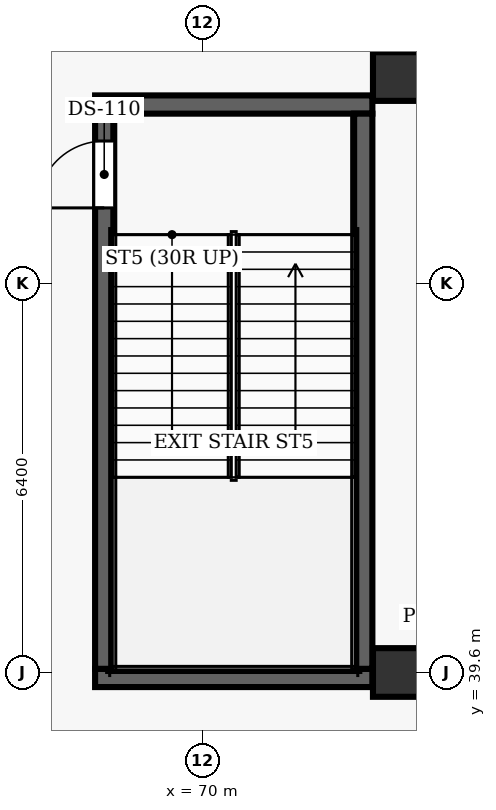
"""IFC4 building model, lengths in metres.
Left out: names, types, materials, properties, quantities, classifications, styles, units other than length and angle.
Written with IfcOpenShell. Run it as: python <this file> out.ifc"""

import sys

from ifc_helpers import new_model, si_unit, direction, frame, frame_2d, origin, origin_2d, place, context, subcontext, project, spatial, rectangle, extrude, element, fill, save


model = new_model("IFC4")
c1 = context("Model", 3, precision=1e-05, world=origin(), true_north=direction((0.0, 1.0)))
c2 = subcontext(c1, "Body", "Model", "MODEL_VIEW")
j1 = project(units=[si_unit("LENGTHUNIT", "METRE"), si_unit("PLANEANGLEUNIT", "RADIAN")], contexts=[c1])
p1 = place(None, origin())
s1 = spatial("IfcSite", under=j1, at=p1, CompositionType="ELEMENT")
p2 = place(p1, origin())
s2 = spatial("IfcBuilding", under=s1, at=p2, CompositionType="ELEMENT")
p3 = place(p2, frame((0.0, 0.0, 30.0)))
s3 = spatial("IfcBuildingStorey", under=s2, at=p3, CompositionType="ELEMENT", Elevation=30.0)
for number, where, z_axis, x_axis in (
    (1, (73.2, 39.6, 0.0), (0.0, 0.0, 1.0), (1.0, 0.0, 0.0)),
    (2, (73.2, 49.4, 0.0), (0.0, 0.0, 1.0), (1.0, 0.0, 0.0)),
):
    element("IfcColumn", number, at=place(p3, frame(where, z_axis=z_axis, x_axis=x_axis)), inside=s3, PredefinedType="COLUMN", context=c2, shape_type="SweptSolid", body=[
        extrude(rectangle(XDim=0.8, YDim=0.8, at=origin_2d()), origin(), (0.0, 0.0, 1.0), 5.4),
    ])
for number, where, z_axis, x_axis in (
    (3, (68.23, 39.51, 0.0), (0.0, 0.0, 1.0), (1.0, 0.0, 0.0)),
    (4, (68.23, 48.94, 0.0), (0.0, 0.0, 1.0), (1.0, 0.0, 0.0)),
):
    element("IfcWall", number, at=place(p3, frame(where, z_axis=z_axis, x_axis=x_axis)), inside=s3, PredefinedType="SHEAR", context=c2, shape_type="SweptSolid", body=[
        extrude(rectangle(XDim=4.56, YDim=0.3, at=frame_2d((2.28, 0.0))), origin(), (0.0, 0.0, 1.0), 5.4),
    ])
p4 = place(p3, frame((68.38, 39.66, 0.0), z_axis=(0.0, 0.0, 1.0), x_axis=(0.0, 1.0, 0.0)))
e5 = element("IfcWall", 5, at=p4, inside=s3, PredefinedType="SHEAR", context=c2, shape_type="SweptSolid", body=[
    extrude(rectangle(XDim=9.13, YDim=0.3, at=frame_2d((4.565, 0.0))), origin(), (0.0, 0.0, 1.0), 5.4),
])
p5 = place(p4, frame((7.58, 0.0, 0.0)))
e6 = element("IfcOpeningElement", 6, at=p5, cuts=e5, PredefinedType="OPENING", context=c2, shape_type="SweptSolid", body=[
    extrude(rectangle(XDim=1.1, YDim=2.15, at=frame_2d((0.55, 1.075))), frame((0.0, 0.16, 0.0), z_axis=(0.0, -1.0, 0.0), x_axis=(1.0, 0.0, 0.0)), (0.0, 0.0, 1.0), 0.32),
])
p6 = place(p3, frame((72.64, 48.79, 0.0), z_axis=(0.0, 0.0, 1.0), x_axis=(0.0, -1.0, 0.0)))
e7 = element("IfcWall", 7, at=p6, inside=s3, PredefinedType="SHEAR", context=c2, shape_type="SweptSolid", body=[
    extrude(rectangle(XDim=9.13, YDim=0.3, at=frame_2d((4.565, 0.0))), origin(), (0.0, 0.0, 1.0), 5.4),
])
p7 = place(p5, origin())
e8 = element("IfcDoor", 8, at=p7, inside=s3, OperationType="SINGLE_SWING_LEFT", PredefinedType="DOOR", context=c2, shape_type="SweptSolid", body=[
    extrude(rectangle(XDim=1.1, YDim=2.15, at=frame_2d((0.55, 1.075))), frame((0.0, 0.025, 0.0), z_axis=(0.0, -1.0, 0.0), x_axis=(1.0, 0.0, 0.0)), (0.0, 0.0, 1.0), 0.05),
])
fill(e6, e8)
save(model, sys.argv[1])
